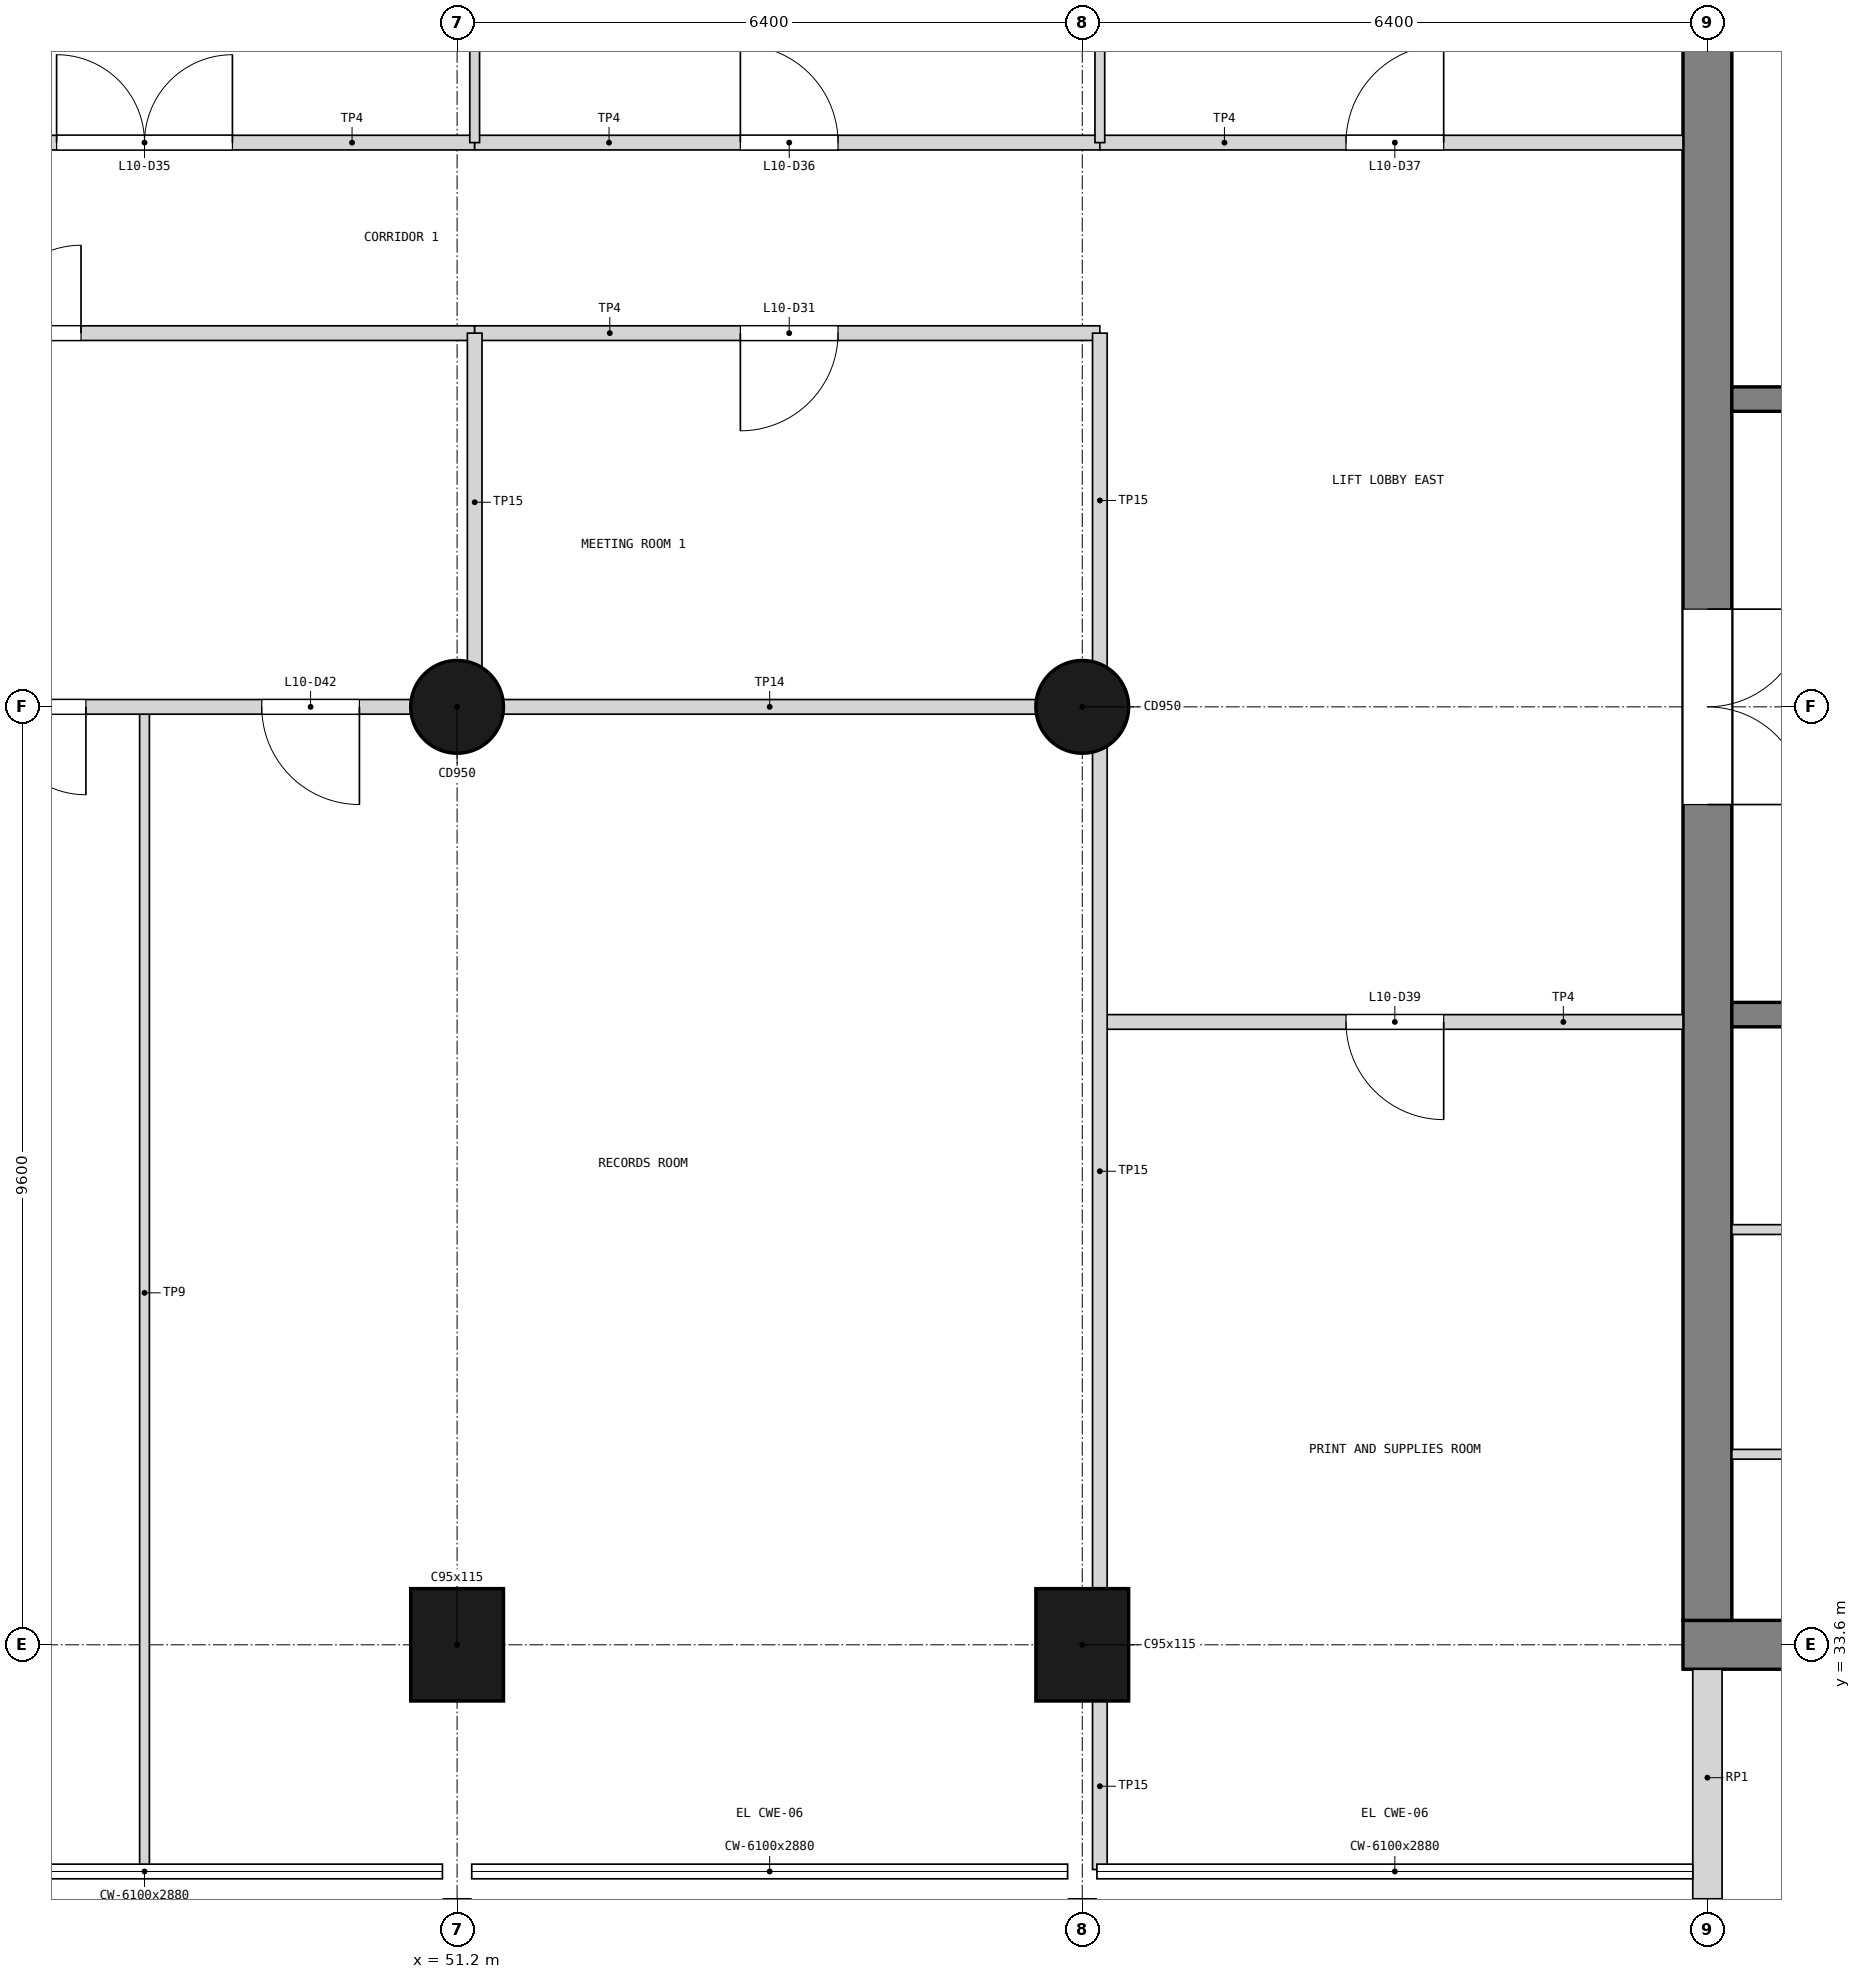
"""IFC4 building model, lengths in metres.
Left out: names, types, materials, properties, quantities, classifications, styles, units other than length and angle.
Written with IfcOpenShell. Run it as: python <this file> out.ifc"""

import sys

from ifc_helpers import new_model, si_unit, direction, frame, frame_2d, origin, origin_2d, place, context, subcontext, project, spatial, rectangle, circle, extrude, element, fill, save


model = new_model("IFC4")
c1 = context("Model", 3, precision=1e-05, world=origin(), true_north=direction((0.0, 1.0)))
c2 = subcontext(c1, "Body", "Model", "MODEL_VIEW")
j1 = project(units=[si_unit("LENGTHUNIT", "METRE"), si_unit("PLANEANGLEUNIT", "RADIAN")], contexts=[c1])
p1 = place(None, origin())
s1 = spatial("IfcSite", under=j1, at=p1, CompositionType="ELEMENT")
p2 = place(p1, origin())
s2 = spatial("IfcBuilding", under=s1, at=p2, CompositionType="ELEMENT")
p3 = place(p2, frame((0.0, 0.0, 40.5)))
s3 = spatial("IfcBuildingStorey", under=s2, at=p3, CompositionType="ELEMENT", Elevation=40.5)
p4 = place(p3, frame((63.75, 33.6, 0.0), z_axis=(0.0, 0.0, 1.0), x_axis=(1.0, 0.0, 0.0)))
e1 = element("IfcWall", 1, at=p4, inside=s3, PredefinedType="SHEAR", context=c2, shape_type="SweptSolid", body=[
    extrude(rectangle(XDim=13.3, YDim=0.5, at=frame_2d((6.65, 0.0))), origin(), (0.0, 0.0, 1.0), 3.9),
])
p5 = place(p4, frame((11.05, 0.0, 1.0)))
e2 = element("IfcOpeningElement", 2, at=p5, cuts=e1, PredefinedType="OPENING", context=c2, shape_type="SweptSolid", body=[
    extrude(rectangle(XDim=0.4, YDim=2.0, at=frame_2d((0.2, 1.0))), frame((0.0, 0.26, 0.0), z_axis=(0.0, -1.0, 0.0), x_axis=(1.0, 0.0, 0.0)), (0.0, 0.0, 1.0), 0.52),
])
p6 = place(p3, frame((64.0, 33.85, 0.0), z_axis=(0.0, 0.0, 1.0), x_axis=(0.0, 1.0, 0.0)))
e3 = element("IfcWall", 3, at=p6, inside=s3, PredefinedType="SHEAR", context=c2, shape_type="SweptSolid", body=[
    extrude(rectangle(XDim=18.7, YDim=0.5, at=frame_2d((9.35, 0.0))), origin(), (0.0, 0.0, 1.0), 3.9),
])
p7 = place(p6, frame((8.35, 0.0, 0.0)))
e4 = element("IfcOpeningElement", 4, at=p7, cuts=e3, PredefinedType="OPENING", context=c2, shape_type="SweptSolid", body=[
    extrude(rectangle(XDim=2.0, YDim=2.1, at=frame_2d((1.0, 1.05))), frame((0.0, 0.26, 0.0), z_axis=(0.0, -1.0, 0.0), x_axis=(1.0, 0.0, 0.0)), (0.0, 0.0, 1.0), 0.52),
])
p8 = place(p3, frame((51.2, 33.6, 0.0), z_axis=(0.0, 0.0, 1.0), x_axis=(1.0, 0.0, 0.0)))
e5 = element("IfcColumn", 5, at=p8, inside=s3, PredefinedType="COLUMN", context=c2, shape_type="SweptSolid", body=[
    extrude(rectangle(XDim=0.95, YDim=1.15, at=origin_2d()), origin(), (0.0, 0.0, 1.0), 3.9),
])
p9 = place(p3, frame((51.2, 43.2, 0.0), z_axis=(0.0, 0.0, 1.0), x_axis=(1.0, 0.0, 0.0)))
e6 = element("IfcColumn", 6, at=p9, inside=s3, PredefinedType="COLUMN", context=c2, shape_type="SweptSolid", body=[
    extrude(circle(Radius=0.475, at=origin_2d()), origin(), (0.0, 0.0, 1.0), 3.9),
])
p10 = place(p3, frame((57.6, 33.6, 0.0), z_axis=(0.0, 0.0, 1.0), x_axis=(1.0, 0.0, 0.0)))
e7 = element("IfcColumn", 7, at=p10, inside=s3, PredefinedType="COLUMN", context=c2, shape_type="SweptSolid", body=[
    extrude(rectangle(XDim=0.95, YDim=1.15, at=origin_2d()), origin(), (0.0, 0.0, 1.0), 3.9),
])
p11 = place(p3, frame((57.6, 43.2, 0.0), z_axis=(0.0, 0.0, 1.0), x_axis=(1.0, 0.0, 0.0)))
e8 = element("IfcColumn", 8, at=p11, inside=s3, PredefinedType="COLUMN", context=c2, shape_type="SweptSolid", body=[
    extrude(circle(Radius=0.475, at=origin_2d()), origin(), (0.0, 0.0, 1.0), 3.9),
])
p12 = place(p3, frame((64.0, 31.0, 0.0), z_axis=(0.0, 0.0, 1.0), x_axis=(0.0, 1.0, 0.0)))
e9 = element("IfcWall", 9, at=p12, inside=s3, PredefinedType="SOLIDWALL", context=c2, shape_type="SweptSolid", body=[
    extrude(rectangle(XDim=2.35, YDim=0.3, at=frame_2d((1.175, 0.0))), origin(), (0.0, 0.0, 1.0), 2.88),
])
for number, where, z_axis, x_axis in (
    (10, (69.725, 40.05, 0.0), (0.0, 0.0, 1.0), (-1.0, 0.0, 0.0)),
    (11, (69.725, 46.35, 0.0), (0.0, 0.0, 1.0), (-1.0, 0.0, 0.0)),
):
    element("IfcWall", number, at=place(p3, frame(where, z_axis=z_axis, x_axis=x_axis)), inside=s3, PredefinedType="SOLIDWALL", context=c2, shape_type="SweptSolid", body=[
        extrude(rectangle(XDim=5.475, YDim=0.25, at=frame_2d((2.738, 0.0))), origin(), (0.0, 0.0, 1.0), 3.6),
    ])
p13 = place(p3, frame((69.475, 35.55, 0.0), z_axis=(0.0, 0.0, 1.0), x_axis=(-1.0, 0.0, 0.0)))
e12 = element("IfcWall", 12, at=p13, inside=s3, PredefinedType="PARTITIONING", context=c2, shape_type="SweptSolid", body=[
    extrude(rectangle(XDim=5.225, YDim=0.1, at=frame_2d((2.613, 0.0))), origin(), (0.0, 0.0, 1.0), 3.6),
])
p14 = place(p3, frame((67.925, 37.85, 0.0), z_axis=(0.0, 0.0, 1.0), x_axis=(-1.0, 0.0, 0.0)))
e13 = element("IfcWall", 13, at=p14, inside=s3, PredefinedType="PARTITIONING", context=c2, shape_type="SweptSolid", body=[
    extrude(rectangle(XDim=3.675, YDim=0.1, at=frame_2d((1.837, 0.0))), origin(), (0.0, 0.0, 1.0), 3.6),
])
p15 = place(p3, frame((48.0, 31.3, 0.0), z_axis=(0.0, 0.0, 1.0), x_axis=(0.0, 1.0, 0.0)))
e14 = element("IfcWall", 14, at=p15, inside=s3, PredefinedType="PARTITIONING", context=c2, shape_type="SweptSolid", body=[
    extrude(rectangle(XDim=11.9, YDim=0.1, at=frame_2d((5.95, 0.0))), origin(), (0.0, 0.0, 1.0), 3.08),
])
p16 = place(p3, frame((31.82, 47.025, 0.0), z_axis=(0.0, 0.0, 1.0), x_axis=(1.0, 0.0, 0.0)))
e15 = element("IfcWall", 15, at=p16, inside=s3, PredefinedType="PARTITIONING", context=c2, shape_type="SweptSolid", body=[
    extrude(rectangle(XDim=19.56, YDim=0.15, at=frame_2d((9.78, 0.0))), origin(), (0.0, 0.0, 1.0), 3.68),
])
p17 = place(p16, frame((4.03, 0.0, 0.0)))
e16 = element("IfcOpeningElement", 16, at=p17, cuts=e15, PredefinedType="OPENING", context=c2, shape_type="SweptSolid", body=[
    extrude(rectangle(XDim=1.8, YDim=2.1, at=frame_2d((0.9, 1.05))), frame((0.0, 0.085, 0.0), z_axis=(0.0, -1.0, 0.0), x_axis=(1.0, 0.0, 0.0)), (0.0, 0.0, 1.0), 0.17),
])
p18 = place(p16, frame((13.73, 0.0, 0.0)))
e17 = element("IfcOpeningElement", 17, at=p18, cuts=e15, PredefinedType="OPENING", context=c2, shape_type="SweptSolid", body=[
    extrude(rectangle(XDim=1.8, YDim=2.1, at=frame_2d((0.9, 1.05))), frame((0.0, 0.085, 0.0), z_axis=(0.0, -1.0, 0.0), x_axis=(1.0, 0.0, 0.0)), (0.0, 0.0, 1.0), 0.17),
])
p19 = place(p3, frame((51.38, 47.025, 0.0), z_axis=(0.0, 0.0, 1.0), x_axis=(1.0, 0.0, 0.0)))
e18 = element("IfcWall", 18, at=p19, inside=s3, PredefinedType="PARTITIONING", context=c2, shape_type="SweptSolid", body=[
    extrude(rectangle(XDim=6.4, YDim=0.15, at=frame_2d((3.2, 0.0))), origin(), (0.0, 0.0, 1.0), 3.68),
])
p20 = place(p19, frame((2.72, 0.0, 0.0)))
e19 = element("IfcOpeningElement", 19, at=p20, cuts=e18, PredefinedType="OPENING", context=c2, shape_type="SweptSolid", body=[
    extrude(rectangle(XDim=1.0, YDim=2.1, at=frame_2d((0.5, 1.05))), frame((0.0, 0.085, 0.0), z_axis=(0.0, -1.0, 0.0), x_axis=(1.0, 0.0, 0.0)), (0.0, 0.0, 1.0), 0.17),
])
p21 = place(p3, frame((51.38, 43.62, 0.0), z_axis=(0.0, 0.0, 1.0), x_axis=(0.0, 1.0, 0.0)))
e20 = element("IfcWall", 20, at=p21, inside=s3, PredefinedType="PARTITIONING", context=c2, shape_type="SweptSolid", body=[
    extrude(rectangle(XDim=3.405, YDim=0.15, at=frame_2d((1.703, 0.0))), origin(), (0.0, 0.0, 1.0), 2.78),
])
p22 = place(p3, frame((44.62, 48.975, 0.0), z_axis=(0.0, 0.0, 1.0), x_axis=(1.0, 0.0, 0.0)))
e21 = element("IfcWall", 21, at=p22, inside=s3, PredefinedType="PARTITIONING", context=c2, shape_type="SweptSolid", body=[
    extrude(rectangle(XDim=6.76, YDim=0.15, at=frame_2d((3.38, 0.0))), origin(), (0.0, 0.0, 1.0), 3.68),
])
p23 = place(p22, frame((2.48, 0.0, 0.0)))
e22 = element("IfcOpeningElement", 22, at=p23, cuts=e21, PredefinedType="OPENING", context=c2, shape_type="SweptSolid", body=[
    extrude(rectangle(XDim=1.8, YDim=2.1, at=frame_2d((0.9, 1.05))), frame((0.0, 0.085, 0.0), z_axis=(0.0, -1.0, 0.0), x_axis=(1.0, 0.0, 0.0)), (0.0, 0.0, 1.0), 0.17),
])
p24 = place(p3, frame((51.38, 48.975, 0.0), z_axis=(0.0, 0.0, 1.0), x_axis=(1.0, 0.0, 0.0)))
e23 = element("IfcWall", 23, at=p24, inside=s3, PredefinedType="PARTITIONING", context=c2, shape_type="SweptSolid", body=[
    extrude(rectangle(XDim=6.4, YDim=0.15, at=frame_2d((3.2, 0.0))), origin(), (0.0, 0.0, 1.0), 3.68),
])
p25 = place(p24, frame((2.72, 0.0, 0.0)))
e24 = element("IfcOpeningElement", 24, at=p25, cuts=e23, PredefinedType="OPENING", context=c2, shape_type="SweptSolid", body=[
    extrude(rectangle(XDim=1.0, YDim=2.1, at=frame_2d((0.5, 1.05))), frame((0.0, 0.085, 0.0), z_axis=(0.0, -1.0, 0.0), x_axis=(1.0, 0.0, 0.0)), (0.0, 0.0, 1.0), 0.17),
])
p26 = place(p3, frame((57.78, 48.975, 0.0), z_axis=(0.0, 0.0, 1.0), x_axis=(1.0, 0.0, 0.0)))
e25 = element("IfcWall", 25, at=p26, inside=s3, PredefinedType="PARTITIONING", context=c2, shape_type="SweptSolid", body=[
    extrude(rectangle(XDim=5.97, YDim=0.15, at=frame_2d((2.985, 0.0))), origin(), (0.0, 0.0, 1.0), 3.68),
])
p27 = place(p26, frame((2.52, 0.0, 0.0)))
e26 = element("IfcOpeningElement", 26, at=p27, cuts=e25, PredefinedType="OPENING", context=c2, shape_type="SweptSolid", body=[
    extrude(rectangle(XDim=1.0, YDim=2.1, at=frame_2d((0.5, 1.05))), frame((0.0, 0.085, 0.0), z_axis=(0.0, -1.0, 0.0), x_axis=(1.0, 0.0, 0.0)), (0.0, 0.0, 1.0), 0.17),
])
for number, where, z_axis, x_axis in (
    (27, (51.38, 48.975, 0.0), (0.0, 0.0, 1.0), (0.0, 1.0, 0.0)),
    (28, (57.78, 48.975, 0.0), (0.0, 0.0, 1.0), (0.0, 1.0, 0.0)),
):
    element("IfcWall", number, at=place(p3, frame(where, z_axis=z_axis, x_axis=x_axis)), inside=s3, PredefinedType="PARTITIONING", context=c2, shape_type="SweptSolid", body=[
        extrude(rectangle(XDim=3.27, YDim=0.1, at=frame_2d((1.635, 0.0))), origin(), (0.0, 0.0, 1.0), 2.78),
    ])
p28 = place(p3, frame((31.82, 43.2, 0.0), z_axis=(0.0, 0.0, 1.0), x_axis=(1.0, 0.0, 0.0)))
e29 = element("IfcWall", 29, at=p28, inside=s3, PredefinedType="PARTITIONING", context=c2, shape_type="SweptSolid", body=[
    extrude(rectangle(XDim=25.96, YDim=0.15, at=frame_2d((12.98, 0.0))), origin(), (0.0, 0.0, 1.0), 2.88),
])
p29 = place(p28, frame((3.975, 0.0, 0.0)))
e30 = element("IfcOpeningElement", 30, at=p29, cuts=e29, PredefinedType="OPENING", context=c2, shape_type="SweptSolid", body=[
    extrude(rectangle(XDim=1.8, YDim=2.1, at=frame_2d((0.9, 1.05))), frame((0.0, 0.085, 0.0), z_axis=(0.0, -1.0, 0.0), x_axis=(1.0, 0.0, 0.0)), (0.0, 0.0, 1.0), 0.17),
])
p30 = place(p28, frame((13.78, 0.0, 0.0)))
e31 = element("IfcOpeningElement", 31, at=p30, cuts=e29, PredefinedType="OPENING", context=c2, shape_type="SweptSolid", body=[
    extrude(rectangle(XDim=1.8, YDim=2.1, at=frame_2d((0.9, 1.05))), frame((0.0, 0.085, 0.0), z_axis=(0.0, -1.0, 0.0), x_axis=(1.0, 0.0, 0.0)), (0.0, 0.0, 1.0), 0.17),
])
p31 = place(p28, frame((17.38, 0.0, 0.0)))
e32 = element("IfcOpeningElement", 32, at=p31, cuts=e29, PredefinedType="OPENING", context=c2, shape_type="SweptSolid", body=[
    extrude(rectangle(XDim=1.0, YDim=2.1, at=frame_2d((0.5, 1.05))), frame((0.0, 0.085, 0.0), z_axis=(0.0, -1.0, 0.0), x_axis=(1.0, 0.0, 0.0)), (0.0, 0.0, 1.0), 0.17),
])
p32 = place(p3, frame((57.78, 39.975, 0.0), z_axis=(0.0, 0.0, 1.0), x_axis=(1.0, 0.0, 0.0)))
e33 = element("IfcWall", 33, at=p32, inside=s3, PredefinedType="PARTITIONING", context=c2, shape_type="SweptSolid", body=[
    extrude(rectangle(XDim=5.97, YDim=0.15, at=frame_2d((2.985, 0.0))), origin(), (0.0, 0.0, 1.0), 3.68),
])
p33 = place(p32, frame((2.52, 0.0, 0.0)))
e34 = element("IfcOpeningElement", 34, at=p33, cuts=e33, PredefinedType="OPENING", context=c2, shape_type="SweptSolid", body=[
    extrude(rectangle(XDim=1.0, YDim=2.1, at=frame_2d((0.5, 1.05))), frame((0.0, 0.085, 0.0), z_axis=(0.0, -1.0, 0.0), x_axis=(1.0, 0.0, 0.0)), (0.0, 0.0, 1.0), 0.17),
])
p34 = place(p3, frame((57.78, 31.3, 0.0), z_axis=(0.0, 0.0, 1.0), x_axis=(0.0, 1.0, 0.0)))
e35 = element("IfcWall", 35, at=p34, inside=s3, PredefinedType="PARTITIONING", context=c2, shape_type="SweptSolid", body=[
    extrude(rectangle(XDim=1.745, YDim=0.15, at=frame_2d((0.873, 0.0))), origin(), (0.0, 0.0, 1.0), 2.78),
])
p35 = place(p3, frame((57.78, 34.155, 0.0), z_axis=(0.0, 0.0, 1.0), x_axis=(0.0, 1.0, 0.0)))
e36 = element("IfcWall", 36, at=p35, inside=s3, PredefinedType="PARTITIONING", context=c2, shape_type="SweptSolid", body=[
    extrude(rectangle(XDim=8.625, YDim=0.15, at=frame_2d((4.313, 0.0))), origin(), (0.0, 0.0, 1.0), 2.78),
])
p36 = place(p3, frame((57.78, 43.62, 0.0), z_axis=(0.0, 0.0, 1.0), x_axis=(0.0, 1.0, 0.0)))
e37 = element("IfcWall", 37, at=p36, inside=s3, PredefinedType="PARTITIONING", context=c2, shape_type="SweptSolid", body=[
    extrude(rectangle(XDim=3.405, YDim=0.15, at=frame_2d((1.703, 0.0))), origin(), (0.0, 0.0, 1.0), 2.78),
])
p37 = place(p7, frame((2.0, 0.0, 0.0), z_axis=(0.0, 0.0, 1.0), x_axis=(-1.0, 0.0, 0.0)))
e38 = element("IfcDoor", 38, at=p37, inside=s3, OperationType="DOUBLE_DOOR_SINGLE_SWING", PredefinedType="DOOR", context=c2, shape_type="SweptSolid", body=[
    extrude(rectangle(XDim=2.0, YDim=2.1, at=frame_2d((1.0, 1.05))), frame((0.0, 0.025, 0.0), z_axis=(0.0, -1.0, 0.0), x_axis=(1.0, 0.0, 0.0)), (0.0, 0.0, 1.0), 0.05),
])
fill(e4, e38)
p38 = place(p18, origin())
e39 = element("IfcDoor", 39, at=p38, inside=s3, OperationType="DOUBLE_DOOR_SINGLE_SWING", PredefinedType="DOOR", context=c2, shape_type="SweptSolid", body=[
    extrude(rectangle(XDim=1.8, YDim=2.1, at=frame_2d((0.9, 1.05))), frame((0.0, 0.025, 0.0), z_axis=(0.0, -1.0, 0.0), x_axis=(1.0, 0.0, 0.0)), (0.0, 0.0, 1.0), 0.05),
])
fill(e17, e39)
p39 = place(p20, frame((1.0, 0.0, 0.0), z_axis=(0.0, 0.0, 1.0), x_axis=(-1.0, 0.0, 0.0)))
e40 = element("IfcDoor", 40, at=p39, inside=s3, OperationType="SINGLE_SWING_RIGHT", PredefinedType="DOOR", context=c2, shape_type="SweptSolid", body=[
    extrude(rectangle(XDim=1.0, YDim=2.1, at=frame_2d((0.5, 1.05))), frame((0.0, 0.025, 0.0), z_axis=(0.0, -1.0, 0.0), x_axis=(1.0, 0.0, 0.0)), (0.0, 0.0, 1.0), 0.05),
])
fill(e19, e40)
p40 = place(p23, origin())
e41 = element("IfcDoor", 41, at=p40, inside=s3, OperationType="DOUBLE_DOOR_SINGLE_SWING", PredefinedType="DOOR", context=c2, shape_type="SweptSolid", body=[
    extrude(rectangle(XDim=1.8, YDim=2.1, at=frame_2d((0.9, 1.05))), frame((0.0, 0.025, 0.0), z_axis=(0.0, -1.0, 0.0), x_axis=(1.0, 0.0, 0.0)), (0.0, 0.0, 1.0), 0.05),
])
fill(e22, e41)
p41 = place(p25, origin())
e42 = element("IfcDoor", 42, at=p41, inside=s3, OperationType="SINGLE_SWING_LEFT", PredefinedType="DOOR", context=c2, shape_type="SweptSolid", body=[
    extrude(rectangle(XDim=1.0, YDim=2.1, at=frame_2d((0.5, 1.05))), frame((0.0, 0.025, 0.0), z_axis=(0.0, -1.0, 0.0), x_axis=(1.0, 0.0, 0.0)), (0.0, 0.0, 1.0), 0.05),
])
fill(e24, e42)
p42 = place(p27, origin())
e43 = element("IfcDoor", 43, at=p42, inside=s3, OperationType="SINGLE_SWING_RIGHT", PredefinedType="DOOR", context=c2, shape_type="SweptSolid", body=[
    extrude(rectangle(XDim=1.0, YDim=2.1, at=frame_2d((0.5, 1.05))), frame((0.0, 0.025, 0.0), z_axis=(0.0, -1.0, 0.0), x_axis=(1.0, 0.0, 0.0)), (0.0, 0.0, 1.0), 0.05),
])
fill(e26, e43)
p43 = place(p33, frame((1.0, 0.0, 0.0), z_axis=(0.0, 0.0, 1.0), x_axis=(-1.0, 0.0, 0.0)))
e44 = element("IfcDoor", 44, at=p43, inside=s3, OperationType="SINGLE_SWING_LEFT", PredefinedType="DOOR", context=c2, shape_type="SweptSolid", body=[
    extrude(rectangle(XDim=1.0, YDim=2.1, at=frame_2d((0.5, 1.05))), frame((0.0, 0.025, 0.0), z_axis=(0.0, -1.0, 0.0), x_axis=(1.0, 0.0, 0.0)), (0.0, 0.0, 1.0), 0.05),
])
fill(e34, e44)
p44 = place(p30, frame((1.8, 0.0, 0.0), z_axis=(0.0, 0.0, 1.0), x_axis=(-1.0, 0.0, 0.0)))
e45 = element("IfcDoor", 45, at=p44, inside=s3, OperationType="DOUBLE_DOOR_SINGLE_SWING", PredefinedType="DOOR", context=c2, shape_type="SweptSolid", body=[
    extrude(rectangle(XDim=1.8, YDim=2.1, at=frame_2d((0.9, 1.05))), frame((0.0, 0.025, 0.0), z_axis=(0.0, -1.0, 0.0), x_axis=(1.0, 0.0, 0.0)), (0.0, 0.0, 1.0), 0.05),
])
fill(e31, e45)
p45 = place(p31, frame((1.0, 0.0, 0.0), z_axis=(0.0, 0.0, 1.0), x_axis=(-1.0, 0.0, 0.0)))
e46 = element("IfcDoor", 46, at=p45, inside=s3, OperationType="SINGLE_SWING_LEFT", PredefinedType="DOOR", context=c2, shape_type="SweptSolid", body=[
    extrude(rectangle(XDim=1.0, YDim=2.1, at=frame_2d((0.5, 1.05))), frame((0.0, 0.025, 0.0), z_axis=(0.0, -1.0, 0.0), x_axis=(1.0, 0.0, 0.0)), (0.0, 0.0, 1.0), 0.05),
])
fill(e32, e46)
save(model, sys.argv[1])
